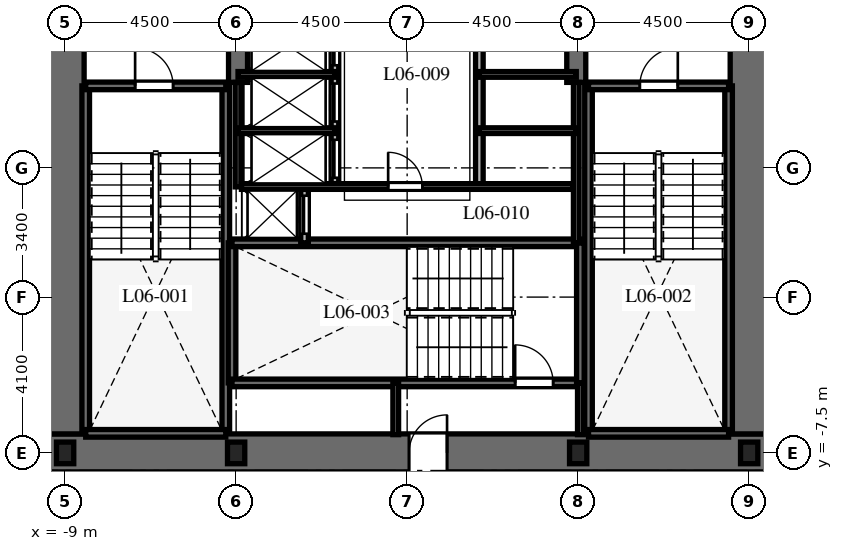
"""IFC4 building model, lengths in metres.
Left out: names, types, materials, properties, quantities, classifications, styles, units other than length and angle.
Written with IfcOpenShell. Run it as: python <this file> out.ifc"""

import sys

from ifc_helpers import new_model, si_unit, direction, frame, frame_2d, origin, origin_2d, place, context, subcontext, project, spatial, rectangle, i_section, extrude, element, fill, save


model = new_model("IFC4")
c1 = context("Model", 3, precision=1e-05, world=origin(), true_north=direction((0.0, 1.0)))
c2 = subcontext(c1, "Body", "Model", "MODEL_VIEW")
j1 = project(units=[si_unit("LENGTHUNIT", "METRE"), si_unit("PLANEANGLEUNIT", "RADIAN")], contexts=[c1])
p1 = place(None, origin())
s1 = spatial("IfcSite", under=j1, at=p1, CompositionType="ELEMENT")
p2 = place(p1, origin())
s2 = spatial("IfcBuilding", under=s1, at=p2, CompositionType="ELEMENT")
p3 = place(p2, frame((0.0, 0.0, 34.2)))
s3 = spatial("IfcBuildingStorey", under=s2, at=p3, CompositionType="ELEMENT", Elevation=34.2)
p4 = place(p3, frame((-9.5, -7.5, 0.0), z_axis=(0.0, 0.0, 1.0), x_axis=(1.0, 0.0, 0.0)))
e1 = element("IfcWall", 1, at=p4, inside=s3, PredefinedType="SHEAR", context=c2, shape_type="SweptSolid", body=[
    extrude(rectangle(XDim=19.0, YDim=1.0, at=frame_2d((9.5, 0.0))), origin(), (0.0, 0.0, 1.0), 3.7),
])
p5 = place(p4, frame((9.55, 0.0, 0.0)))
e2 = element("IfcOpeningElement", 2, at=p5, cuts=e1, PredefinedType="OPENING", context=c2, shape_type="SweptSolid", body=[
    extrude(rectangle(XDim=1.0, YDim=2.15, at=frame_2d((0.5, 1.075))), frame((0.0, 0.51, 0.0), z_axis=(0.0, -1.0, 0.0), x_axis=(1.0, 0.0, 0.0)), (0.0, 0.0, 1.0), 1.02),
])
p6 = place(p3, frame((-9.0, -7.0, 0.0), z_axis=(0.0, 0.0, 1.0), x_axis=(0.0, 1.0, 0.0)))
e3 = element("IfcWall", 3, at=p6, inside=s3, PredefinedType="SHEAR", context=c2, shape_type="SweptSolid", body=[
    extrude(rectangle(XDim=14.0, YDim=1.0, at=frame_2d((7.0, 0.0))), origin(), (0.0, 0.0, 1.0), 3.7),
])
p7 = place(p6, frame((10.125, 0.0, 0.0)))
e4 = element("IfcOpeningElement", 4, at=p7, cuts=e3, PredefinedType="OPENING", context=c2, shape_type="SweptSolid", body=[
    extrude(rectangle(XDim=1.05, YDim=2.15, at=frame_2d((0.525, 1.075))), frame((0.0, 0.51, 0.0), z_axis=(0.0, -1.0, 0.0), x_axis=(1.0, 0.0, 0.0)), (0.0, 0.0, 1.0), 1.02),
])
p8 = place(p3, frame((9.0, -7.0, 0.0), z_axis=(0.0, 0.0, 1.0), x_axis=(0.0, 1.0, 0.0)))
e5 = element("IfcWall", 5, at=p8, inside=s3, PredefinedType="SHEAR", context=c2, shape_type="SweptSolid", body=[
    extrude(rectangle(XDim=14.0, YDim=1.0, at=frame_2d((7.0, 0.0))), origin(), (0.0, 0.0, 1.0), 3.7),
])
p9 = place(p8, frame((10.125, 0.0, 0.0)))
e6 = element("IfcOpeningElement", 6, at=p9, cuts=e5, PredefinedType="OPENING", context=c2, shape_type="SweptSolid", body=[
    extrude(rectangle(XDim=1.05, YDim=2.15, at=frame_2d((0.525, 1.075))), frame((0.0, 0.51, 0.0), z_axis=(0.0, -1.0, 0.0), x_axis=(1.0, 0.0, 0.0)), (0.0, 0.0, 1.0), 1.02),
])
for number, where, z_axis, x_axis in (
    (7, (-4.45, 2.25, 0.0), (0.0, 0.0, 1.0), (0.0, 1.0, 0.0)),
    (8, (4.45, 2.25, 0.0), (0.0, 0.0, 1.0), (0.0, 1.0, 0.0)),
):
    element("IfcWall", number, at=place(p3, frame(where, z_axis=z_axis, x_axis=x_axis)), inside=s3, PredefinedType="SHEAR", context=c2, shape_type="SweptSolid", body=[
        extrude(rectangle(XDim=4.75, YDim=0.5, at=frame_2d((2.375, 0.0))), origin(), (0.0, 0.0, 1.0), 3.7),
    ])
for number, where, z_axis, x_axis in (
    (9, (-8.458, -6.985, 0.0), (0.0, 0.0, 1.0), (0.0, 1.0, 0.0)),
    (10, (-4.772, -6.985, 0.0), (0.0, 0.0, 1.0), (0.0, 1.0, 0.0)),
):
    element("IfcWall", number, at=place(p3, frame(where, z_axis=z_axis, x_axis=x_axis)), inside=s3, PredefinedType="SHEAR", context=c2, shape_type="SweptSolid", body=[
        extrude(rectangle(XDim=9.143, YDim=0.2, at=frame_2d((4.572, 0.0))), origin(), (0.0, 0.0, 1.0), 3.7),
    ])
p10 = place(p3, frame((-8.458, -6.985, 0.0), z_axis=(0.0, 0.0, 1.0), x_axis=(1.0, 0.0, 0.0)))
e11 = element("IfcWall", 11, at=p10, inside=s3, PredefinedType="SHEAR", context=c2, shape_type="SweptSolid", body=[
    extrude(rectangle(XDim=3.686, YDim=0.2, at=frame_2d((1.843, 0.0))), origin(), (0.0, 0.0, 1.0), 3.7),
])
p11 = place(p3, frame((-8.458, 2.158, 0.0), z_axis=(0.0, 0.0, 1.0), x_axis=(1.0, 0.0, 0.0)))
e12 = element("IfcWall", 12, at=p11, inside=s3, PredefinedType="SHEAR", context=c2, shape_type="SweptSolid", body=[
    extrude(rectangle(XDim=3.686, YDim=0.2, at=frame_2d((1.843, 0.0))), origin(), (0.0, 0.0, 1.0), 3.7),
])
p12 = place(p11, frame((1.3, 0.0, 0.0)))
e13 = element("IfcOpeningElement", 13, at=p12, cuts=e12, PredefinedType="OPENING", context=c2, shape_type="SweptSolid", body=[
    extrude(rectangle(XDim=1.0, YDim=2.15, at=frame_2d((0.5, 1.075))), frame((0.0, 0.11, 0.0), z_axis=(0.0, -1.0, 0.0), x_axis=(1.0, 0.0, 0.0)), (0.0, 0.0, 1.0), 0.22),
])
for number, where, z_axis, x_axis in (
    (14, (4.772, -6.985, 0.0), (0.0, 0.0, 1.0), (0.0, 1.0, 0.0)),
    (15, (8.458, -6.985, 0.0), (0.0, 0.0, 1.0), (0.0, 1.0, 0.0)),
):
    element("IfcWall", number, at=place(p3, frame(where, z_axis=z_axis, x_axis=x_axis)), inside=s3, PredefinedType="SHEAR", context=c2, shape_type="SweptSolid", body=[
        extrude(rectangle(XDim=9.143, YDim=0.2, at=frame_2d((4.572, 0.0))), origin(), (0.0, 0.0, 1.0), 3.7),
    ])
p13 = place(p3, frame((4.772, -6.985, 0.0), z_axis=(0.0, 0.0, 1.0), x_axis=(1.0, 0.0, 0.0)))
e16 = element("IfcWall", 16, at=p13, inside=s3, PredefinedType="SHEAR", context=c2, shape_type="SweptSolid", body=[
    extrude(rectangle(XDim=3.686, YDim=0.2, at=frame_2d((1.843, 0.0))), origin(), (0.0, 0.0, 1.0), 3.7),
])
p14 = place(p3, frame((4.772, 2.158, 0.0), z_axis=(0.0, 0.0, 1.0), x_axis=(1.0, 0.0, 0.0)))
e17 = element("IfcWall", 17, at=p14, inside=s3, PredefinedType="SHEAR", context=c2, shape_type="SweptSolid", body=[
    extrude(rectangle(XDim=3.686, YDim=0.2, at=frame_2d((1.843, 0.0))), origin(), (0.0, 0.0, 1.0), 3.7),
])
p15 = place(p14, frame((1.35, 0.0, 0.0)))
e18 = element("IfcOpeningElement", 18, at=p15, cuts=e17, PredefinedType="OPENING", context=c2, shape_type="SweptSolid", body=[
    extrude(rectangle(XDim=1.0, YDim=2.15, at=frame_2d((0.5, 1.075))), frame((0.0, 0.11, 0.0), z_axis=(0.0, -1.0, 0.0), x_axis=(1.0, 0.0, 0.0)), (0.0, 0.0, 1.0), 0.22),
])
p16 = place(p3, frame((-4.608, -5.658, 0.0), z_axis=(0.0, 0.0, 1.0), x_axis=(0.0, 1.0, 0.0)))
e19 = element("IfcWall", 19, at=p16, inside=s3, PredefinedType="SHEAR", context=c2, shape_type="SweptSolid", body=[
    extrude(rectangle(XDim=3.686, YDim=0.2, at=frame_2d((1.843, 0.0))), origin(), (0.0, 0.0, 1.0), 3.7),
])
p17 = place(p3, frame((-4.608, -5.658, 0.0), z_axis=(0.0, 0.0, 1.0), x_axis=(1.0, 0.0, 0.0)))
e20 = element("IfcWall", 20, at=p17, inside=s3, PredefinedType="SHEAR", context=c2, shape_type="SweptSolid", body=[
    extrude(rectangle(XDim=9.166, YDim=0.2, at=frame_2d((4.583, 0.0))), origin(), (0.0, 0.0, 1.0), 3.7),
])
p18 = place(p17, frame((7.45, 0.0, 0.0)))
e21 = element("IfcOpeningElement", 21, at=p18, cuts=e20, PredefinedType="OPENING", context=c2, shape_type="SweptSolid", body=[
    extrude(rectangle(XDim=1.0, YDim=2.15, at=frame_2d((0.5, 1.075))), frame((0.0, 0.11, 0.0), z_axis=(0.0, -1.0, 0.0), x_axis=(1.0, 0.0, 0.0)), (0.0, 0.0, 1.0), 0.22),
])
p19 = place(p3, frame((-4.608, -1.972, 0.0), z_axis=(0.0, 0.0, 1.0), x_axis=(1.0, 0.0, 0.0)))
e22 = element("IfcWall", 22, at=p19, inside=s3, PredefinedType="SHEAR", context=c2, shape_type="SweptSolid", body=[
    extrude(rectangle(XDim=9.166, YDim=0.2, at=frame_2d((4.583, 0.0))), origin(), (0.0, 0.0, 1.0), 3.7),
])
p20 = place(p3, frame((4.558, -5.658, 0.0), z_axis=(0.0, 0.0, 1.0), x_axis=(0.0, 1.0, 0.0)))
e23 = element("IfcWall", 23, at=p20, inside=s3, PredefinedType="SHEAR", context=c2, shape_type="SweptSolid", body=[
    extrude(rectangle(XDim=3.686, YDim=0.2, at=frame_2d((1.843, 0.0))), origin(), (0.0, 0.0, 1.0), 3.7),
])
for number, where, z_axis, x_axis in (
    (24, (-9.0, -7.5, 0.0), (0.0, 0.0, 1.0), (1.0, 0.0, 0.0)),
    (25, (-4.5, -7.5, 0.0), (0.0, 0.0, 1.0), (1.0, 0.0, 0.0)),
    (26, (4.5, -7.5, 0.0), (0.0, 0.0, 1.0), (1.0, 0.0, 0.0)),
    (27, (9.0, -7.5, 0.0), (0.0, 0.0, 1.0), (1.0, 0.0, 0.0)),
):
    element("IfcColumn", number, at=place(p3, frame(where, z_axis=z_axis, x_axis=x_axis)), inside=s3, PredefinedType="COLUMN", context=c2, shape_type="SweptSolid", body=[
        extrude(i_section(OverallWidth=0.454, OverallDepth=0.569, WebThickness=0.078, FlangeThickness=0.125, at=origin_2d()), origin(), (0.0, 0.0, 1.0), 3.7),
    ])
for number, where, z_axis, x_axis in (
    (28, (-0.3, -7.02, 0.0), (0.0, 0.0, 1.0), (0.0, 1.0, 0.0)),
    (29, (4.558, -7.02, 0.0), (0.0, 0.0, 1.0), (0.0, 1.0, 0.0)),
):
    element("IfcWall", number, at=place(p3, frame(where, z_axis=z_axis, x_axis=x_axis)), inside=s3, PredefinedType="PARTITIONING", context=c2, shape_type="SweptSolid", body=[
        extrude(rectangle(XDim=1.362, YDim=0.15, at=frame_2d((0.681, 0.0))), origin(), (0.0, 0.0, 1.0), 3.4),
    ])
p21 = place(p3, frame((-2.7, -1.972, 0.0), z_axis=(0.0, 0.0, 1.0), x_axis=(0.0, 1.0, 0.0)))
e30 = element("IfcWall", 30, at=p21, inside=s3, PredefinedType="PARTITIONING", context=c2, shape_type="SweptSolid", body=[
    extrude(rectangle(XDim=1.472, YDim=0.2, at=frame_2d((0.736, 0.0))), origin(), (0.0, 0.0, 1.0), 3.4),
])
p22 = place(p21, frame((0.24, 0.0, 0.0)))
e31 = element("IfcOpeningElement", 31, at=p22, cuts=e30, PredefinedType="OPENING", context=c2, shape_type="SweptSolid", body=[
    extrude(rectangle(XDim=1.0, YDim=2.2, at=frame_2d((0.5, 1.1))), frame((0.0, 0.11, 0.0), z_axis=(0.0, -1.0, 0.0), x_axis=(1.0, 0.0, 0.0)), (0.0, 0.0, 1.0), 0.22),
])
p23 = place(p3, frame((-4.45, -0.5, 0.0), z_axis=(0.0, 0.0, 1.0), x_axis=(0.0, 1.0, 0.0)))
e32 = element("IfcWall", 32, at=p23, inside=s3, PredefinedType="PARTITIONING", context=c2, shape_type="SweptSolid", body=[
    extrude(rectangle(XDim=2.75, YDim=0.15, at=frame_2d((1.375, 0.0))), origin(), (0.0, 0.0, 1.0), 3.4),
])
p24 = place(p3, frame((4.45, -1.972, 0.0), z_axis=(0.0, 0.0, 1.0), x_axis=(0.0, 1.0, 0.0)))
e33 = element("IfcWall", 33, at=p24, inside=s3, PredefinedType="PARTITIONING", context=c2, shape_type="SweptSolid", body=[
    extrude(rectangle(XDim=4.222, YDim=0.15, at=frame_2d((2.111, 0.0))), origin(), (0.0, 0.0, 1.0), 3.4),
])
p25 = place(p3, frame((-1.9, -0.5, 0.0), z_axis=(0.0, 0.0, 1.0), x_axis=(0.0, 1.0, 0.0)))
e34 = element("IfcWall", 34, at=p25, inside=s3, PredefinedType="PARTITIONING", context=c2, shape_type="SweptSolid", body=[
    extrude(rectangle(XDim=4.44, YDim=0.2, at=frame_2d((2.22, 0.0))), origin(), (0.0, 0.0, 1.0), 3.4),
])
p26 = place(p25, frame((0.24, 0.0, 0.0)))
e35 = element("IfcOpeningElement", 35, at=p26, cuts=e34, PredefinedType="OPENING", context=c2, shape_type="SweptSolid", body=[
    extrude(rectangle(XDim=1.0, YDim=2.2, at=frame_2d((0.5, 1.1))), frame((0.0, 0.11, 0.0), z_axis=(0.0, -1.0, 0.0), x_axis=(1.0, 0.0, 0.0)), (0.0, 0.0, 1.0), 0.22),
])
p27 = place(p25, frame((1.72, 0.0, 0.0)))
e36 = element("IfcOpeningElement", 36, at=p27, cuts=e34, PredefinedType="OPENING", context=c2, shape_type="SweptSolid", body=[
    extrude(rectangle(XDim=1.0, YDim=2.2, at=frame_2d((0.5, 1.1))), frame((0.0, 0.11, 0.0), z_axis=(0.0, -1.0, 0.0), x_axis=(1.0, 0.0, 0.0)), (0.0, 0.0, 1.0), 0.22),
])
p28 = place(p25, frame((3.2, 0.0, 0.0)))
e37 = element("IfcOpeningElement", 37, at=p28, cuts=e34, PredefinedType="OPENING", context=c2, shape_type="SweptSolid", body=[
    extrude(rectangle(XDim=1.0, YDim=2.2, at=frame_2d((0.5, 1.1))), frame((0.0, 0.11, 0.0), z_axis=(0.0, -1.0, 0.0), x_axis=(1.0, 0.0, 0.0)), (0.0, 0.0, 1.0), 0.22),
])
for number, where, z_axis, x_axis in (
    (38, (-4.45, 0.98, 0.0), (0.0, 0.0, 1.0), (1.0, 0.0, 0.0)),
    (39, (-4.45, 2.46, 0.0), (0.0, 0.0, 1.0), (1.0, 0.0, 0.0)),
):
    element("IfcWall", number, at=place(p3, frame(where, z_axis=z_axis, x_axis=x_axis)), inside=s3, PredefinedType="PARTITIONING", context=c2, shape_type="SweptSolid", body=[
        extrude(rectangle(XDim=2.55, YDim=0.15, at=frame_2d((1.275, 0.0))), origin(), (0.0, 0.0, 1.0), 3.4),
    ])
p29 = place(p3, frame((1.9, -0.5, 0.0), z_axis=(0.0, 0.0, 1.0), x_axis=(0.0, 1.0, 0.0)))
e40 = element("IfcWall", 40, at=p29, inside=s3, PredefinedType="PARTITIONING", context=c2, shape_type="SweptSolid", body=[
    extrude(rectangle(XDim=4.44, YDim=0.2, at=frame_2d((2.22, 0.0))), origin(), (0.0, 0.0, 1.0), 3.4),
])
for number, where, z_axis, x_axis in (
    (41, (1.9, 0.98, 0.0), (0.0, 0.0, 1.0), (1.0, 0.0, 0.0)),
    (42, (1.9, 2.46, 0.0), (0.0, 0.0, 1.0), (1.0, 0.0, 0.0)),
):
    element("IfcWall", number, at=place(p3, frame(where, z_axis=z_axis, x_axis=x_axis)), inside=s3, PredefinedType="PARTITIONING", context=c2, shape_type="SweptSolid", body=[
        extrude(rectangle(XDim=2.55, YDim=0.15, at=frame_2d((1.275, 0.0))), origin(), (0.0, 0.0, 1.0), 3.4),
    ])
p30 = place(p3, frame((-4.36, -0.49, 0.0), z_axis=(0.0, 0.0, 1.0), x_axis=(1.0, 0.0, 0.0)))
e43 = element("IfcWall", 43, at=p30, inside=s3, PredefinedType="PARTITIONING", context=c2, shape_type="SweptSolid", body=[
    extrude(rectangle(XDim=8.72, YDim=0.15, at=frame_2d((4.36, 0.0))), origin(), (0.0, 0.0, 1.0), 3.4),
])
p31 = place(p30, frame((3.86, 0.0, 0.0)))
e44 = element("IfcOpeningElement", 44, at=p31, cuts=e43, PredefinedType="OPENING", context=c2, shape_type="SweptSolid", body=[
    extrude(rectangle(XDim=0.9, YDim=2.03, at=frame_2d((0.45, 1.015))), frame((0.0, 0.085, 0.0), z_axis=(0.0, -1.0, 0.0), x_axis=(1.0, 0.0, 0.0)), (0.0, 0.0, 1.0), 0.17),
])
p32 = place(p12, origin())
e45 = element("IfcDoor", 45, at=p32, inside=s3, OperationType="SINGLE_SWING_LEFT", PredefinedType="DOOR", context=c2, shape_type="SweptSolid", body=[
    extrude(rectangle(XDim=1.0, YDim=2.15, at=frame_2d((0.5, 1.075))), frame((0.0, 0.025, 0.0), z_axis=(0.0, -1.0, 0.0), x_axis=(1.0, 0.0, 0.0)), (0.0, 0.0, 1.0), 0.05),
])
fill(e13, e45)
p33 = place(p15, origin())
e46 = element("IfcDoor", 46, at=p33, inside=s3, OperationType="SINGLE_SWING_RIGHT", PredefinedType="DOOR", context=c2, shape_type="SweptSolid", body=[
    extrude(rectangle(XDim=1.0, YDim=2.15, at=frame_2d((0.5, 1.075))), frame((0.0, 0.025, 0.0), z_axis=(0.0, -1.0, 0.0), x_axis=(1.0, 0.0, 0.0)), (0.0, 0.0, 1.0), 0.05),
])
fill(e18, e46)
p34 = place(p18, origin())
e47 = element("IfcDoor", 47, at=p34, inside=s3, OperationType="SINGLE_SWING_LEFT", PredefinedType="DOOR", context=c2, shape_type="SweptSolid", body=[
    extrude(rectangle(XDim=1.0, YDim=2.15, at=frame_2d((0.5, 1.075))), frame((0.0, 0.025, 0.0), z_axis=(0.0, -1.0, 0.0), x_axis=(1.0, 0.0, 0.0)), (0.0, 0.0, 1.0), 0.05),
])
fill(e21, e47)
p35 = place(p5, origin())
e48 = element("IfcDoor", 48, at=p35, inside=s3, OperationType="SINGLE_SWING_RIGHT", PredefinedType="DOOR", context=c2, shape_type="SweptSolid", body=[
    extrude(rectangle(XDim=1.0, YDim=2.15, at=frame_2d((0.5, 1.075))), frame((0.0, 0.025, 0.0), z_axis=(0.0, -1.0, 0.0), x_axis=(1.0, 0.0, 0.0)), (0.0, 0.0, 1.0), 0.05),
])
fill(e2, e48)
p36 = place(p22, origin())
e49 = element("IfcDoor", 49, at=p36, inside=s3, OperationType="SLIDING_TO_LEFT", PredefinedType="DOOR", context=c2, shape_type="SweptSolid", body=[
    extrude(rectangle(XDim=1.0, YDim=2.2, at=frame_2d((0.5, 1.1))), frame((0.0, 0.025, 0.0), z_axis=(0.0, -1.0, 0.0), x_axis=(1.0, 0.0, 0.0)), (0.0, 0.0, 1.0), 0.05),
])
fill(e31, e49)
p37 = place(p26, origin())
e50 = element("IfcDoor", 50, at=p37, inside=s3, OperationType="SLIDING_TO_LEFT", PredefinedType="DOOR", context=c2, shape_type="SweptSolid", body=[
    extrude(rectangle(XDim=1.0, YDim=2.2, at=frame_2d((0.5, 1.1))), frame((0.0, 0.025, 0.0), z_axis=(0.0, -1.0, 0.0), x_axis=(1.0, 0.0, 0.0)), (0.0, 0.0, 1.0), 0.05),
])
fill(e35, e50)
p38 = place(p27, origin())
e51 = element("IfcDoor", 51, at=p38, inside=s3, OperationType="SLIDING_TO_LEFT", PredefinedType="DOOR", context=c2, shape_type="SweptSolid", body=[
    extrude(rectangle(XDim=1.0, YDim=2.2, at=frame_2d((0.5, 1.1))), frame((0.0, 0.025, 0.0), z_axis=(0.0, -1.0, 0.0), x_axis=(1.0, 0.0, 0.0)), (0.0, 0.0, 1.0), 0.05),
])
fill(e36, e51)
p39 = place(p28, origin())
e52 = element("IfcDoor", 52, at=p39, inside=s3, OperationType="SLIDING_TO_LEFT", PredefinedType="DOOR", context=c2, shape_type="SweptSolid", body=[
    extrude(rectangle(XDim=1.0, YDim=2.2, at=frame_2d((0.5, 1.1))), frame((0.0, 0.025, 0.0), z_axis=(0.0, -1.0, 0.0), x_axis=(1.0, 0.0, 0.0)), (0.0, 0.0, 1.0), 0.05),
])
fill(e37, e52)
p40 = place(p31, origin())
e53 = element("IfcDoor", 53, at=p40, inside=s3, OperationType="SINGLE_SWING_LEFT", PredefinedType="DOOR", context=c2, shape_type="SweptSolid", body=[
    extrude(rectangle(XDim=0.9, YDim=2.03, at=frame_2d((0.45, 1.015))), frame((0.0, 0.025, 0.0), z_axis=(0.0, -1.0, 0.0), x_axis=(1.0, 0.0, 0.0)), (0.0, 0.0, 1.0), 0.05),
])
fill(e44, e53)
save(model, sys.argv[1])
